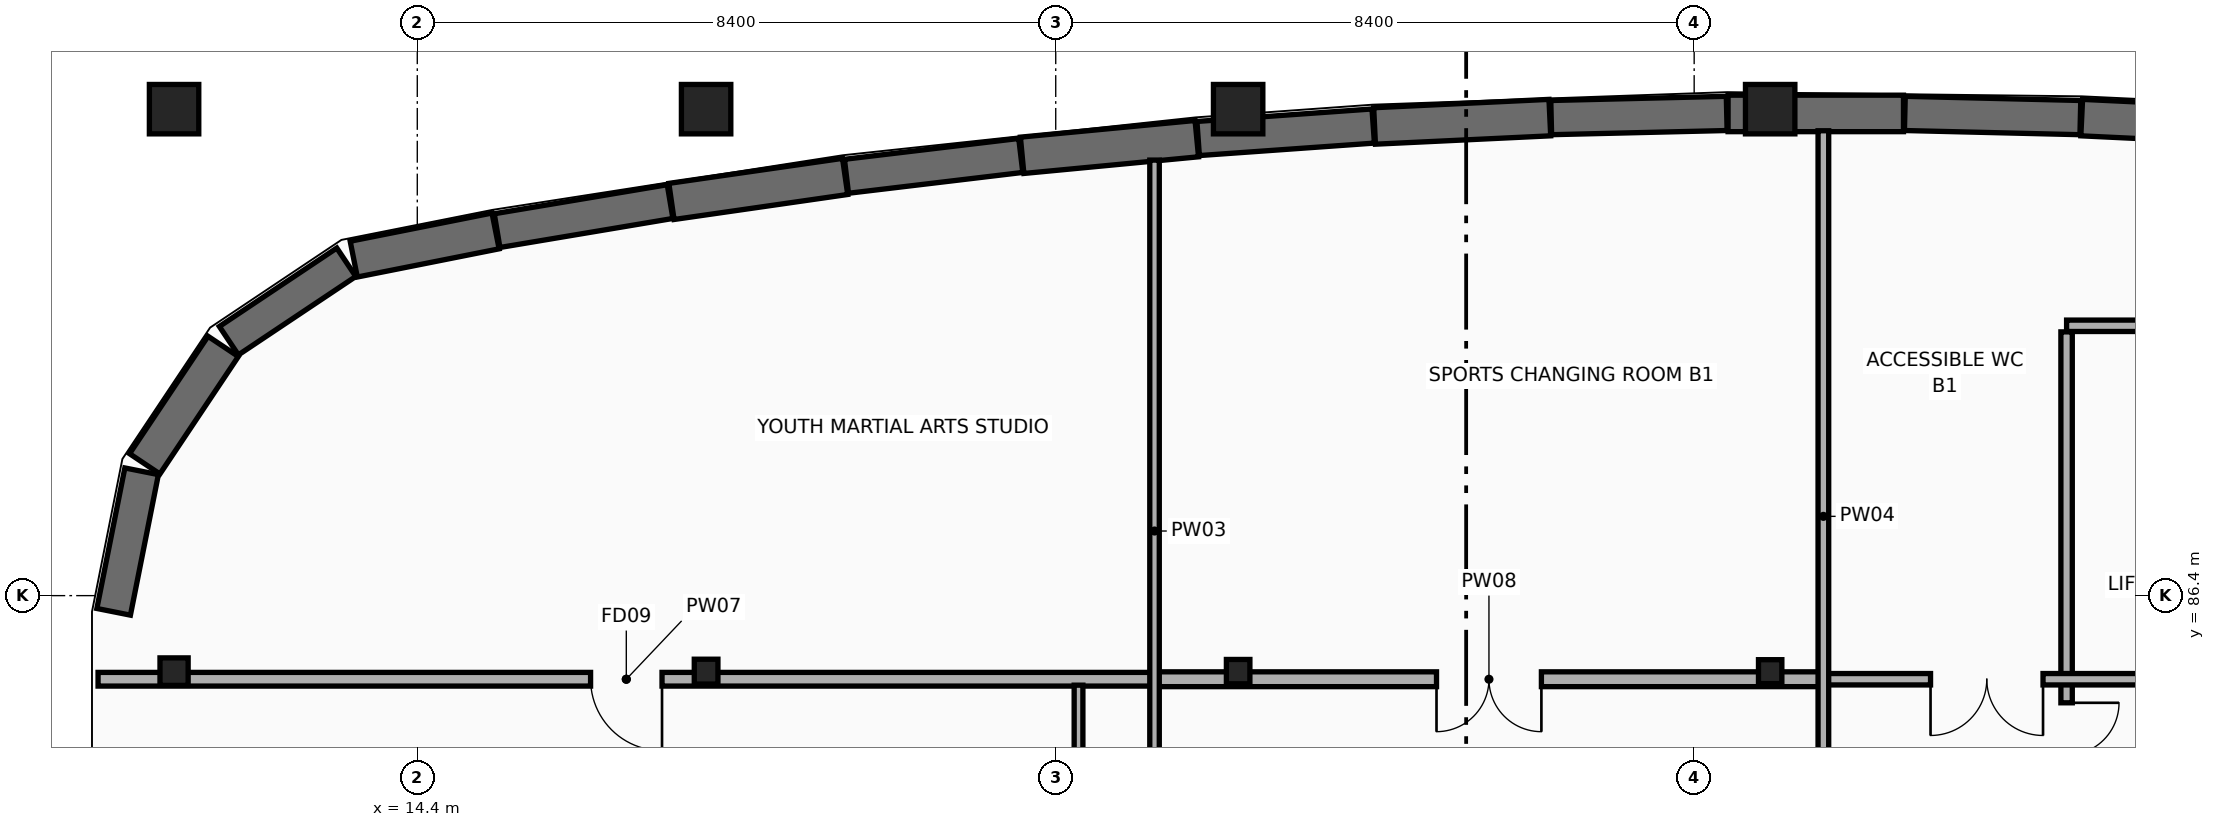
"""IFC4 building model, lengths in metres.
Left out: names, types, materials, properties, quantities, classifications, styles, units other than length and angle.
Written with IfcOpenShell. Run it as: python <this file> out.ifc"""

import sys

from ifc_helpers import new_model, si_unit, direction, frame, frame_2d, origin, origin_2d, place, context, subcontext, project, spatial, rectangle, i_section, extrude, element, fill, save


model = new_model("IFC4")
c1 = context("Model", 3, precision=1e-05, world=origin(), true_north=direction((0.0, 1.0)))
c2 = subcontext(c1, "Body", "Model", "MODEL_VIEW")
j1 = project(units=[si_unit("LENGTHUNIT", "METRE"), si_unit("PLANEANGLEUNIT", "RADIAN")], contexts=[c1])
p1 = place(None, origin())
s1 = spatial("IfcSite", under=j1, at=p1, CompositionType="ELEMENT")
p2 = place(p1, origin())
s2 = spatial("IfcBuilding", under=s1, at=p2, CompositionType="ELEMENT")
p3 = place(p2, frame((0.0, 0.0, -4.2)))
s3 = spatial("IfcBuildingStorey", under=s2, at=p3, CompositionType="ELEMENT", Elevation=-4.2)
for number, where, z_axis, x_axis in (
    (1, (11.2, 92.8, -0.415), (0.0, 0.0, 1.0), (1.0, 0.0, 0.0)),
    (2, (18.2, 92.8, -0.415), (0.0, 0.0, 1.0), (1.0, 0.0, 0.0)),
    (3, (25.2, 92.8, -0.415), (0.0, 0.0, 1.0), (1.0, 0.0, 0.0)),
    (4, (32.2, 92.8, -0.415), (0.0, 0.0, 1.0), (1.0, 0.0, 0.0)),
):
    element("IfcColumn", number, at=place(p3, frame(where, z_axis=z_axis, x_axis=x_axis)), inside=s3, PredefinedType="COLUMN", context=c2, shape_type="SweptSolid", body=[
        extrude(rectangle(XDim=0.65, YDim=0.65, at=origin_2d()), origin(), (0.0, 0.0, 1.0), 4.615),
    ])
p4 = place(p3, frame((11.2, 85.4, -0.415), z_axis=(0.0, 0.0, 1.0), x_axis=(1.0, 0.0, 0.0)))
e5 = element("IfcColumn", 5, at=p4, inside=s3, PredefinedType="COLUMN", context=c2, shape_type="SweptSolid", body=[
    extrude(i_section(OverallWidth=0.371, OverallDepth=0.362, WebThickness=0.012, FlangeThickness=0.021, at=origin_2d()), origin(), (0.0, 0.0, 1.0), 4.615),
])
p5 = place(p3, frame((18.2, 85.4, -0.415), z_axis=(0.0, 0.0, 1.0), x_axis=(1.0, 0.0, 0.0)))
e6 = element("IfcColumn", 6, at=p5, inside=s3, PredefinedType="COLUMN", context=c2, shape_type="SweptSolid", body=[
    extrude(i_section(OverallWidth=0.311, OverallDepth=0.327, WebThickness=0.016, FlangeThickness=0.025, at=origin_2d()), origin(), (0.0, 0.0, 1.0), 4.615),
])
p6 = place(p3, frame((25.2, 85.4, -0.415), z_axis=(0.0, 0.0, 1.0), x_axis=(1.0, 0.0, 0.0)))
e7 = element("IfcColumn", 7, at=p6, inside=s3, PredefinedType="COLUMN", context=c2, shape_type="SweptSolid", body=[
    extrude(i_section(OverallWidth=0.309, OverallDepth=0.321, WebThickness=0.014, FlangeThickness=0.022, at=origin_2d()), origin(), (0.0, 0.0, 1.0), 4.615),
])
p7 = place(p3, frame((32.2, 85.4, -0.415), z_axis=(0.0, 0.0, 1.0), x_axis=(1.0, 0.0, 0.0)))
e8 = element("IfcColumn", 8, at=p7, inside=s3, PredefinedType="COLUMN", context=c2, shape_type="SweptSolid", body=[
    extrude(i_section(OverallWidth=0.307, OverallDepth=0.314, WebThickness=0.012, FlangeThickness=0.019, at=origin_2d()), origin(), (0.0, 0.0, 1.0), 4.615),
])
p8 = place(p3, frame((36.299, 92.689, 0.0), z_axis=(0.0, 0.0, 1.0), x_axis=(0.998866941072, -0.04759027247, 0.0)))
e9 = element("IfcWall", 9, at=p8, inside=s3, PredefinedType="STANDARD", context=c2, shape_type="SweptSolid", body=[
    extrude(rectangle(XDim=2.309, YDim=0.48, at=frame_2d((1.154, 0.0))), origin(), (0.0, 0.0, 1.0), 3.882),
])
p9 = place(p3, frame((33.972, 92.744, 0.0), z_axis=(0.0, 0.0, 1.0), x_axis=(0.999717152638, -0.023782655883, 0.0)))
e10 = element("IfcWall", 10, at=p9, inside=s3, PredefinedType="STANDARD", context=c2, shape_type="SweptSolid", body=[
    extrude(rectangle(XDim=2.31, YDim=0.45, at=frame_2d((1.155, 0.0))), origin(), (0.0, 0.0, 1.0), 3.882),
])
p10 = place(p3, frame((31.646, 92.744, 0.0), z_axis=(0.0, 0.0, 1.0), x_axis=(1.0, 0.0, 0.0)))
e11 = element("IfcWall", 11, at=p10, inside=s3, PredefinedType="STANDARD", context=c2, shape_type="SweptSolid", body=[
    extrude(rectangle(XDim=2.308, YDim=0.48, at=frame_2d((1.154, 0.0))), origin(), (0.0, 0.0, 1.0), 3.882),
])
p11 = place(p3, frame((29.319, 92.689, 0.0), z_axis=(0.0, 0.0, 1.0), x_axis=(0.999717092843, 0.023785169281, 0.0)))
e12 = element("IfcWall", 12, at=p11, inside=s3, PredefinedType="STANDARD", context=c2, shape_type="SweptSolid", body=[
    extrude(rectangle(XDim=2.31, YDim=0.45, at=frame_2d((1.155, 0.0))), origin(), (0.0, 0.0, 1.0), 3.882),
])
p12 = place(p3, frame((26.995, 92.579, 0.0), z_axis=(0.0, 0.0, 1.0), x_axis=(0.998866941072, 0.04759027247, 0.0)))
e13 = element("IfcWall", 13, at=p12, inside=s3, PredefinedType="STANDARD", context=c2, shape_type="SweptSolid", body=[
    extrude(rectangle(XDim=2.309, YDim=0.48, at=frame_2d((1.154, 0.0))), origin(), (0.0, 0.0, 1.0), 3.882),
])
p13 = place(p3, frame((24.674, 92.414, 0.0), z_axis=(0.0, 0.0, 1.0), x_axis=(0.997479590791, 0.07095397068, 0.0)))
e14 = element("IfcWall", 14, at=p13, inside=s3, PredefinedType="STANDARD", context=c2, shape_type="SweptSolid", body=[
    extrude(rectangle(XDim=2.309, YDim=0.45, at=frame_2d((1.154, 0.0))), origin(), (0.0, 0.0, 1.0), 3.882),
])
p14 = place(p3, frame((22.358, 92.193, 0.0), z_axis=(0.0, 0.0, 1.0), x_axis=(0.995490242646, 0.094863991039, 0.0)))
e15 = element("IfcWall", 15, at=p14, inside=s3, PredefinedType="STANDARD", context=c2, shape_type="SweptSolid", body=[
    extrude(rectangle(XDim=2.309, YDim=0.48, at=frame_2d((1.154, 0.0))), origin(), (0.0, 0.0, 1.0), 3.882),
])
p15 = place(p3, frame((20.047, 91.917, 0.0), z_axis=(0.0, 0.0, 1.0), x_axis=(0.992939732449, 0.118619929707, 0.0)))
e16 = element("IfcWall", 16, at=p15, inside=s3, PredefinedType="STANDARD", context=c2, shape_type="SweptSolid", body=[
    extrude(rectangle(XDim=2.309, YDim=0.45, at=frame_2d((1.155, 0.0))), origin(), (0.0, 0.0, 1.0), 3.882),
])
p16 = place(p3, frame((17.744, 91.586, 0.0), z_axis=(0.0, 0.0, 1.0), x_axis=(0.989788119438, 0.142546408654, 0.0)))
e17 = element("IfcWall", 17, at=p16, inside=s3, PredefinedType="STANDARD", context=c2, shape_type="SweptSolid", body=[
    extrude(rectangle(XDim=2.309, YDim=0.48, at=frame_2d((1.154, 0.0))), origin(), (0.0, 0.0, 1.0), 3.882),
])
p17 = place(p3, frame((15.45, 91.202, 0.0), z_axis=(0.0, 0.0, 1.0), x_axis=(0.986201703838, 0.165548178323, 0.0)))
e18 = element("IfcWall", 18, at=p17, inside=s3, PredefinedType="STANDARD", context=c2, shape_type="SweptSolid", body=[
    extrude(rectangle(XDim=2.308, YDim=0.45, at=frame_2d((1.154, 0.0))), origin(), (0.0, 0.0, 1.0), 3.882),
])
p18 = place(p3, frame((13.564, 90.827, 0.0), z_axis=(0.0, 0.0, 1.0), x_axis=(0.980792332268, 0.195054866551, 0.0)))
e19 = element("IfcWall", 19, at=p18, inside=s3, PredefinedType="STANDARD", context=c2, shape_type="SweptSolid", body=[
    extrude(rectangle(XDim=1.903, YDim=0.48, at=frame_2d((0.951, 0.0))), origin(), (0.0, 0.0, 1.0), 3.882),
])
p19 = place(p3, frame((11.921, 89.754, 0.0), z_axis=(0.0, 0.0, 1.0), x_axis=(0.831585073681, 0.555397393972, 0.0)))
e20 = element("IfcWall", 20, at=p19, inside=s3, PredefinedType="STANDARD", context=c2, shape_type="SweptSolid", body=[
    extrude(rectangle(XDim=1.858, YDim=0.45, at=frame_2d((0.929, 0.0))), origin(), (0.0, 0.0, 1.0), 3.882),
])
p20 = place(p3, frame((10.814, 88.134, 0.0), z_axis=(0.0, 0.0, 1.0), x_axis=(0.55545808423, 0.831544536789, 0.0)))
e21 = element("IfcWall", 21, at=p20, inside=s3, PredefinedType="STANDARD", context=c2, shape_type="SweptSolid", body=[
    extrude(rectangle(XDim=1.858, YDim=0.48, at=frame_2d((0.929, 0.0))), origin(), (0.0, 0.0, 1.0), 3.882),
])
p21 = place(p3, frame((10.405, 86.187, 0.0), z_axis=(0.0, 0.0, 1.0), x_axis=(0.195169633953, 0.980769500944, 0.0)))
e22 = element("IfcWall", 22, at=p21, inside=s3, PredefinedType="STANDARD", context=c2, shape_type="SweptSolid", body=[
    extrude(rectangle(XDim=1.885, YDim=0.45, at=frame_2d((0.942, 0.0))), origin(), (0.0, 0.0, 1.0), 3.882),
])
p22 = place(p3, frame((40.453, 89.95, 0.0), z_axis=(0.0, 0.0, 1.0), x_axis=(-1.0, 0.0, 0.0)))
e23 = element("IfcWall", 23, at=p22, inside=s3, PredefinedType="PARTITIONING", context=c2, shape_type="SweptSolid", body=[
    extrude(rectangle(XDim=4.353, YDim=0.15, at=frame_2d((2.176, 0.0))), origin(), (0.0, 0.0, 1.0), 3.17),
])
p23 = place(p3, frame((36.1, 89.87, 0.0), z_axis=(0.0, 0.0, 1.0), x_axis=(0.0, -1.0, 0.0)))
e24 = element("IfcWall", 24, at=p23, inside=s3, PredefinedType="PARTITIONING", context=c2, shape_type="SweptSolid", body=[
    extrude(rectangle(XDim=11.14, YDim=0.15, at=frame_2d((5.57, 0.0))), origin(), (0.0, 0.0, 1.0), 3.12),
])
p24 = place(p23, frame((4.88, 0.0, 0.0)))
e25 = element("IfcOpeningElement", 25, at=p24, cuts=e24, PredefinedType="OPENING", context=c2, shape_type="SweptSolid", body=[
    extrude(rectangle(XDim=1.38, YDim=2.2, at=frame_2d((0.69, 1.1))), frame((0.0, 0.085, 0.0), z_axis=(0.0, -1.0, 0.0), x_axis=(1.0, 0.0, 0.0)), (0.0, 0.0, 1.0), 0.17),
])
p25 = place(p3, frame((24.1, 85.3, 0.0), z_axis=(0.0, 0.0, 1.0), x_axis=(-1.0, 0.0, 0.0)))
e26 = element("IfcWall", 26, at=p25, inside=s3, PredefinedType="PARTITIONING", context=c2, shape_type="SweptSolid", body=[
    extrude(rectangle(XDim=13.9, YDim=0.18, at=frame_2d((6.95, 0.0))), origin(), (0.0, 0.0, 1.0), 3.12),
])
p26 = place(p25, frame((6.48, 0.0, 0.0)))
e27 = element("IfcOpeningElement", 27, at=p26, cuts=e26, PredefinedType="OPENING", context=c2, shape_type="SweptSolid", body=[
    extrude(rectangle(XDim=0.94, YDim=2.1, at=frame_2d((0.47, 1.05))), frame((0.0, 0.1, 0.0), z_axis=(0.0, -1.0, 0.0), x_axis=(1.0, 0.0, 0.0)), (0.0, 0.0, 1.0), 0.2),
])
p27 = place(p3, frame((32.9, 85.3, 0.0), z_axis=(0.0, 0.0, 1.0), x_axis=(-1.0, 0.0, 0.0)))
e28 = element("IfcWall", 28, at=p27, inside=s3, PredefinedType="PARTITIONING", context=c2, shape_type="SweptSolid", body=[
    extrude(rectangle(XDim=8.8, YDim=0.195, at=frame_2d((4.4, 0.0))), origin(), (0.0, 0.0, 1.0), 3.12),
])
p28 = place(p27, frame((3.71, 0.0, 0.0)))
e29 = element("IfcOpeningElement", 29, at=p28, cuts=e28, PredefinedType="OPENING", context=c2, shape_type="SweptSolid", body=[
    extrude(rectangle(XDim=1.38, YDim=2.2, at=frame_2d((0.69, 1.1))), frame((0.0, 0.107, 0.0), z_axis=(0.0, -1.0, 0.0), x_axis=(1.0, 0.0, 0.0)), (0.0, 0.0, 1.0), 0.215),
])
p29 = place(p3, frame((40.45, 85.3, 0.0), z_axis=(0.0, 0.0, 1.0), x_axis=(-1.0, 0.0, 0.0)))
e30 = element("IfcWall", 30, at=p29, inside=s3, PredefinedType="PARTITIONING", context=c2, shape_type="SweptSolid", body=[
    extrude(rectangle(XDim=7.55, YDim=0.15, at=frame_2d((3.775, 0.0))), origin(), (0.0, 0.0, 1.0), 3.12),
])
p30 = place(p29, frame((4.66, 0.0, 0.0)))
e31 = element("IfcOpeningElement", 31, at=p30, cuts=e30, PredefinedType="OPENING", context=c2, shape_type="SweptSolid", body=[
    extrude(rectangle(XDim=1.48, YDim=2.22, at=frame_2d((0.74, 1.11))), frame((0.0, 0.085, 0.0), z_axis=(0.0, -1.0, 0.0), x_axis=(1.0, 0.0, 0.0)), (0.0, 0.0, 1.0), 0.17),
])
p31 = place(p3, frame((23.1, 76.365, 0.0), z_axis=(0.0, 0.0, 1.0), x_axis=(0.0, 1.0, 0.0)))
e32 = element("IfcWall", 32, at=p31, inside=s3, PredefinedType="PARTITIONING", context=c2, shape_type="SweptSolid", body=[
    extrude(rectangle(XDim=8.857, YDim=0.115, at=frame_2d((4.428, 0.0))), origin(), (0.0, 0.0, 1.0), 3.12),
])
p32 = place(p3, frame((24.1, 82.37, 0.0), z_axis=(0.0, 0.0, 1.0), x_axis=(0.0, 1.0, 0.0)))
e33 = element("IfcWall", 33, at=p32, inside=s3, PredefinedType="PARTITIONING", context=c2, shape_type="SweptSolid", body=[
    extrude(rectangle(XDim=9.76, YDim=0.125, at=frame_2d((4.88, 0.0))), origin(), (0.0, 0.0, 1.0), 3.12),
])
p33 = place(p3, frame((32.9, 82.37, 0.0), z_axis=(0.0, 0.0, 1.0), x_axis=(0.0, 1.0, 0.0)))
e34 = element("IfcWall", 34, at=p33, inside=s3, PredefinedType="PARTITIONING", context=c2, shape_type="SweptSolid", body=[
    extrude(rectangle(XDim=10.146, YDim=0.14, at=frame_2d((5.073, 0.0))), origin(), (0.0, 0.0, 1.0), 3.12),
])
p34 = place(p24, origin())
e35 = element("IfcDoor", 35, at=p34, inside=s3, OperationType="DOUBLE_DOOR_SINGLE_SWING", PredefinedType="DOOR", context=c2, shape_type="SweptSolid", body=[
    extrude(rectangle(XDim=1.38, YDim=2.2, at=frame_2d((0.69, 1.1))), frame((0.0, 0.025, 0.0), z_axis=(0.0, -1.0, 0.0), x_axis=(1.0, 0.0, 0.0)), (0.0, 0.0, 1.0), 0.05),
])
fill(e25, e35)
p35 = place(p26, origin())
e36 = element("IfcDoor", 36, at=p35, inside=s3, OperationType="SINGLE_SWING_LEFT", PredefinedType="DOOR", context=c2, shape_type="SweptSolid", body=[
    extrude(rectangle(XDim=0.94, YDim=2.1, at=frame_2d((0.47, 1.05))), frame((0.0, 0.025, 0.0), z_axis=(0.0, -1.0, 0.0), x_axis=(1.0, 0.0, 0.0)), (0.0, 0.0, 1.0), 0.05),
])
fill(e27, e36)
p36 = place(p28, origin())
e37 = element("IfcDoor", 37, at=p36, inside=s3, OperationType="DOUBLE_DOOR_SINGLE_SWING", PredefinedType="DOOR", context=c2, shape_type="SweptSolid", body=[
    extrude(rectangle(XDim=1.38, YDim=2.2, at=frame_2d((0.69, 1.1))), frame((0.0, 0.025, 0.0), z_axis=(0.0, -1.0, 0.0), x_axis=(1.0, 0.0, 0.0)), (0.0, 0.0, 1.0), 0.05),
])
fill(e29, e37)
p37 = place(p30, origin())
e38 = element("IfcDoor", 38, at=p37, inside=s3, OperationType="DOUBLE_DOOR_SINGLE_SWING", PredefinedType="DOOR", context=c2, shape_type="SweptSolid", body=[
    extrude(rectangle(XDim=1.48, YDim=2.22, at=frame_2d((0.74, 1.11))), frame((0.0, 0.025, 0.0), z_axis=(0.0, -1.0, 0.0), x_axis=(1.0, 0.0, 0.0)), (0.0, 0.0, 1.0), 0.05),
])
fill(e31, e38)
save(model, sys.argv[1])
